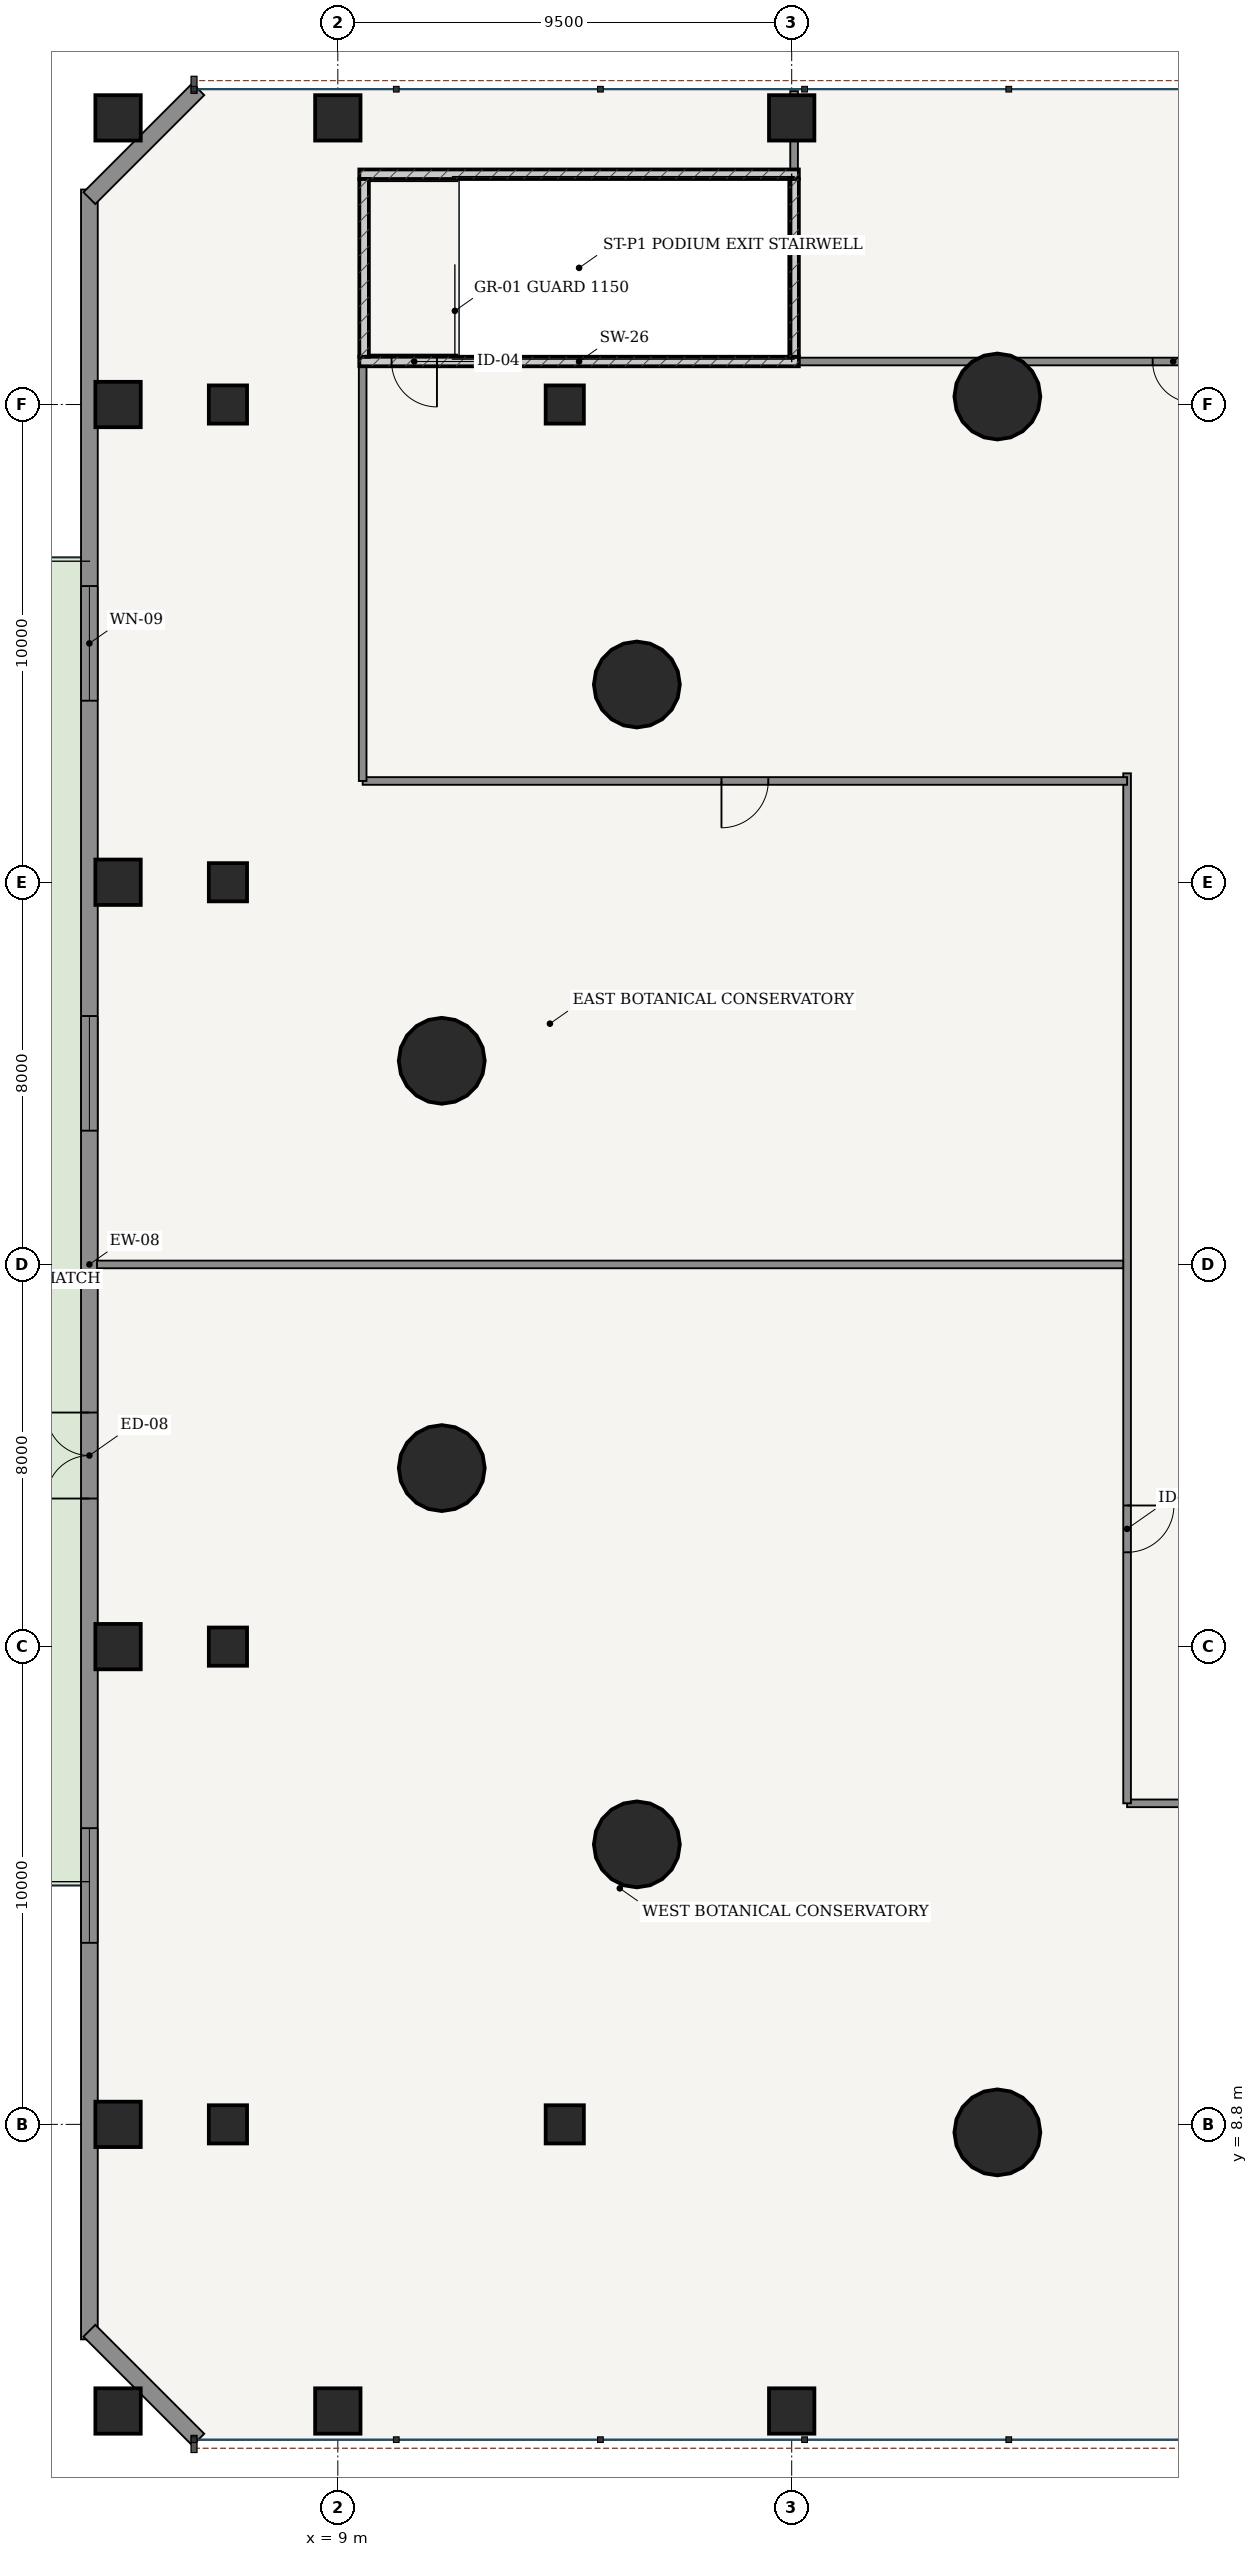
"""IFC4 building model, lengths in metres.
Left out: names, types, materials, properties, quantities, classifications, styles, units other than length and angle.
Written with IfcOpenShell. Run it as: python <this file> out.ifc"""

import sys

from ifc_helpers import new_model, si_unit, direction, frame, frame_2d, origin, origin_2d, place, context, subcontext, project, spatial, rectangle, hollow_circle, extrude, source, transform, mapped, element, fill, save


model = new_model("IFC4")
c1 = context("Model", 3, precision=1e-05, world=origin(), true_north=direction((-0.2419218956, 0.970295726276)))
c2 = subcontext(c1, "Body", "Model", "MODEL_VIEW")
j1 = project(units=[si_unit("LENGTHUNIT", "METRE"), si_unit("PLANEANGLEUNIT", "RADIAN")], contexts=[c1])
p1 = place(None, origin())
s1 = spatial("IfcSite", under=j1, at=p1, CompositionType="ELEMENT")
p2 = place(p1, origin())
s2 = spatial("IfcBuilding", under=s1, at=p2, CompositionType="ELEMENT")
p3 = place(p2, frame((0.0, 0.0, 18.9)))
s3 = spatial("IfcBuildingStorey", under=s2, at=p3, CompositionType="ELEMENT", Elevation=18.9)
p4 = place(p3, frame((9.45, 45.7, 0.0), z_axis=(0.0, 0.0, 1.0), x_axis=(1.0, 0.0, 0.0)))
e1 = element("IfcWall", 1, at=p4, inside=s3, PredefinedType="SOLIDWALL", context=c2, shape_type="SweptSolid", body=[
    extrude(rectangle(XDim=9.2, YDim=0.2, at=frame_2d((4.6, 0.0))), origin(), (0.0, 0.0, 1.0), 4.82),
])
p5 = place(p4, frame((0.675, 0.0, 0.0)))
e2 = element("IfcOpeningElement", 2, at=p5, cuts=e1, PredefinedType="OPENING", context=c2, shape_type="SweptSolid", body=[
    extrude(rectangle(XDim=0.95, YDim=2.15, at=frame_2d((0.475, 1.075))), frame((0.0, 0.11, 0.0), z_axis=(0.0, -1.0, 0.0), x_axis=(1.0, 0.0, 0.0)), (0.0, 0.0, 1.0), 0.22),
])
p6 = place(p3, frame((9.45, 49.62, 0.0), z_axis=(0.0, 0.0, 1.0), x_axis=(1.0, 0.0, 0.0)))
e3 = element("IfcWall", 3, at=p6, inside=s3, PredefinedType="SOLIDWALL", context=c2, shape_type="SweptSolid", body=[
    extrude(rectangle(XDim=9.2, YDim=0.2, at=frame_2d((4.6, 0.0))), origin(), (0.0, 0.0, 1.0), 4.82),
])
for number, where, z_axis, x_axis in (
    (4, (9.55, 45.8, 0.0), (0.0, 0.0, 1.0), (0.0, 1.0, 0.0)),
    (5, (18.55, 45.8, 0.0), (0.0, 0.0, 1.0), (0.0, 1.0, 0.0)),
):
    element("IfcWall", number, at=place(p3, frame(where, z_axis=z_axis, x_axis=x_axis)), inside=s3, PredefinedType="SOLIDWALL", context=c2, shape_type="SweptSolid", body=[
        extrude(rectangle(XDim=3.72, YDim=0.2, at=frame_2d((1.86, 0.0))), origin(), (0.0, 0.0, 1.0), 4.82),
    ])
for number, where, z_axis, x_axis in (
    (6, (22.805, 44.968, 0.0), (0.0, 0.0, 1.0), (1.0, 0.0, 0.0)),
    (7, (15.259, 38.939, 0.0), (0.0, 0.0, 1.0), (1.0, 0.0, 0.0)),
    (8, (11.176, 31.063, 0.0), (0.0, 0.0, 1.0), (1.0, 0.0, 0.0)),
    (9, (11.176, 22.537, 0.0), (0.0, 0.0, 1.0), (1.0, 0.0, 0.0)),
    (10, (15.259, 14.661, 0.0), (0.0, 0.0, 1.0), (1.0, 0.0, 0.0)),
    (11, (22.805, 8.632, 0.0), (0.0, 0.0, 1.0), (1.0, 0.0, 0.0)),
):
    element("IfcColumn", number, at=place(p3, frame(where, z_axis=z_axis, x_axis=x_axis)), inside=s3, PredefinedType="COLUMN", context=c2, shape_type="SweptSolid", body=[
        extrude(hollow_circle(Radius=0.9, WallThickness=0.055, at=origin_2d()), origin(), (0.0, 0.0, 1.0), 5.1),
    ])
for number, where, z_axis, x_axis in (
    (12, (4.4, 2.8, 0.0), (0.0, 0.0, 1.0), (1.0, 0.0, 0.0)),
    (13, (4.4, 8.8, 0.0), (0.0, 0.0, 1.0), (1.0, 0.0, 0.0)),
    (14, (4.4, 18.8, 0.0), (0.0, 0.0, 1.0), (1.0, 0.0, 0.0)),
    (15, (4.4, 34.8, 0.0), (0.0, 0.0, 1.0), (1.0, 0.0, 0.0)),
    (16, (4.4, 44.8, 0.0), (0.0, 0.0, 1.0), (1.0, 0.0, 0.0)),
    (17, (4.4, 50.8, 0.0), (0.0, 0.0, 1.0), (1.0, 0.0, 0.0)),
    (18, (9.0, 2.8, 0.0), (0.0, 0.0, 1.0), (1.0, 0.0, 0.0)),
    (19, (9.0, 50.8, 0.0), (0.0, 0.0, 1.0), (1.0, 0.0, 0.0)),
    (20, (18.5, 2.8, 0.0), (0.0, 0.0, 1.0), (1.0, 0.0, 0.0)),
    (21, (18.5, 50.8, 0.0), (0.0, 0.0, 1.0), (1.0, 0.0, 0.0)),
):
    element("IfcColumn", number, at=place(p3, frame(where, z_axis=z_axis, x_axis=x_axis)), inside=s3, PredefinedType="COLUMN", context=c2, shape_type="SweptSolid", body=[
        extrude(rectangle(XDim=0.95, YDim=0.95, at=origin_2d()), origin(), (0.0, 0.0, 1.0), 5.1),
    ])
for number, where, z_axis, x_axis in (
    (22, (6.7, 8.8, -0.45), (0.0, 0.0, 1.0), (1.0, 0.0, 0.0)),
    (23, (13.75, 8.8, -0.45), (0.0, 0.0, 1.0), (1.0, 0.0, 0.0)),
    (24, (6.7, 18.8, -0.45), (0.0, 0.0, 1.0), (1.0, 0.0, 0.0)),
    (25, (6.7, 34.8, -0.45), (0.0, 0.0, 1.0), (1.0, 0.0, 0.0)),
    (26, (6.7, 44.8, -0.45), (0.0, 0.0, 1.0), (1.0, 0.0, 0.0)),
    (27, (13.75, 44.8, -0.45), (0.0, 0.0, 1.0), (1.0, 0.0, 0.0)),
):
    element("IfcColumn", number, at=place(p3, frame(where, z_axis=z_axis, x_axis=x_axis)), inside=s3, PredefinedType="COLUMN", context=c2, shape_type="SweptSolid", body=[
        extrude(rectangle(XDim=0.8, YDim=0.8, at=origin_2d()), origin(), (0.0, 0.0, 1.0), 5.55),
    ])
p7 = place(p3, frame((3.8, 49.3, 0.0), z_axis=(0.0, 0.0, 1.0), x_axis=(0.0, -1.0, 0.0)))
e28 = element("IfcWall", 28, at=p7, inside=s3, PredefinedType="SOLIDWALL", context=c2, shape_type="SweptSolid", body=[
    extrude(rectangle(XDim=45.0, YDim=0.35, at=frame_2d((22.5, 0.0))), origin(), (0.0, 0.0, 1.0), 4.82),
])
p8 = place(p7, frame((8.3, 0.0, 0.85)))
e29 = element("IfcOpeningElement", 29, at=p8, cuts=e28, PredefinedType="OPENING", context=c2, shape_type="SweptSolid", body=[
    extrude(rectangle(XDim=2.4, YDim=2.2, at=frame_2d((1.2, 1.1))), frame((0.0, 0.185, 0.0), z_axis=(0.0, -1.0, 0.0), x_axis=(1.0, 0.0, 0.0)), (0.0, 0.0, 1.0), 0.37),
])
p9 = place(p7, frame((17.3, 0.0, 0.85)))
e30 = element("IfcOpeningElement", 30, at=p9, cuts=e28, PredefinedType="OPENING", context=c2, shape_type="SweptSolid", body=[
    extrude(rectangle(XDim=2.4, YDim=2.2, at=frame_2d((1.2, 1.1))), frame((0.0, 0.185, 0.0), z_axis=(0.0, -1.0, 0.0), x_axis=(1.0, 0.0, 0.0)), (0.0, 0.0, 1.0), 0.37),
])
p10 = place(p7, frame((34.3, 0.0, 0.85)))
e31 = element("IfcOpeningElement", 31, at=p10, cuts=e28, PredefinedType="OPENING", context=c2, shape_type="SweptSolid", body=[
    extrude(rectangle(XDim=2.4, YDim=2.2, at=frame_2d((1.2, 1.1))), frame((0.0, 0.185, 0.0), z_axis=(0.0, -1.0, 0.0), x_axis=(1.0, 0.0, 0.0)), (0.0, 0.0, 1.0), 0.37),
])
p11 = place(p7, frame((25.6, 0.0, 0.0)))
e32 = element("IfcOpeningElement", 32, at=p11, cuts=e28, PredefinedType="OPENING", context=c2, shape_type="SweptSolid", body=[
    extrude(rectangle(XDim=1.8, YDim=2.4, at=frame_2d((0.9, 1.2))), frame((0.0, 0.185, 0.0), z_axis=(0.0, -1.0, 0.0), x_axis=(1.0, 0.0, 0.0)), (0.0, 0.0, 1.0), 0.37),
])
for number, where, z_axis, x_axis in (
    (33, (3.8, 4.48, 0.0), (0.0, 0.0, 1.0), (0.707, -0.707, 0.0)),
    (34, (6.08, 51.4, 0.0), (0.0, 0.0, 1.0), (-0.707, -0.707, 0.0)),
):
    element("IfcWall", number, at=place(p3, frame(where, z_axis=z_axis, x_axis=x_axis)), inside=s3, PredefinedType="SOLIDWALL", context=c2, shape_type="SweptSolid", body=[
        extrude(rectangle(XDim=3.224, YDim=0.35, at=frame_2d((1.612, 0.0))), origin(), (0.0, 0.0, 1.0), 3.855),
    ])
p12 = place(p3, frame((25.52, 15.52, 0.0), z_axis=(0.0, 0.0, 1.0), x_axis=(1.0, 0.0, 0.0)))
e35 = element("IfcWall", 35, at=p12, inside=s3, PredefinedType="PARTITIONING", context=c2, shape_type="SweptSolid", body=[
    extrude(rectangle(XDim=24.96, YDim=0.16, at=frame_2d((12.48, 0.0))), origin(), (0.0, 0.0, 1.0), 4.188),
])
p13 = place(p12, frame((5.854, 0.0, 0.0)))
e36 = element("IfcOpeningElement", 36, at=p13, cuts=e35, PredefinedType="OPENING", context=c2, shape_type="SweptSolid", body=[
    extrude(rectangle(XDim=0.98, YDim=2.2, at=frame_2d((0.49, 1.1))), frame((0.0, 0.09, 0.0), z_axis=(0.0, -1.0, 0.0), x_axis=(1.0, 0.0, 0.0)), (0.0, 0.0, 1.0), 0.18),
])
p14 = place(p12, frame((18.125, 0.0, 0.0)))
e37 = element("IfcOpeningElement", 37, at=p14, cuts=e35, PredefinedType="OPENING", context=c2, shape_type="SweptSolid", body=[
    extrude(rectangle(XDim=0.98, YDim=2.2, at=frame_2d((0.49, 1.1))), frame((0.0, 0.09, 0.0), z_axis=(0.0, -1.0, 0.0), x_axis=(1.0, 0.0, 0.0)), (0.0, 0.0, 1.0), 0.18),
])
p15 = place(p3, frame((25.52, 15.52, 0.0), z_axis=(0.0, 0.0, 1.0), x_axis=(0.0, 1.0, 0.0)))
e38 = element("IfcWall", 38, at=p15, inside=s3, PredefinedType="PARTITIONING", context=c2, shape_type="SweptSolid", body=[
    extrude(rectangle(XDim=21.56, YDim=0.16, at=frame_2d((10.78, 0.0))), origin(), (0.0, 0.0, 1.0), 4.188),
])
p16 = place(p15, frame((5.254, 0.0, 0.0)))
e39 = element("IfcOpeningElement", 39, at=p16, cuts=e38, PredefinedType="OPENING", context=c2, shape_type="SweptSolid", body=[
    extrude(rectangle(XDim=0.98, YDim=2.2, at=frame_2d((0.49, 1.1))), frame((0.0, 0.09, 0.0), z_axis=(0.0, -1.0, 0.0), x_axis=(1.0, 0.0, 0.0)), (0.0, 0.0, 1.0), 0.18),
])
p17 = place(p3, frame((9.52, 36.92, 0.0), z_axis=(0.0, 0.0, 1.0), x_axis=(1.0, 0.0, 0.0)))
e40 = element("IfcWall", 40, at=p17, inside=s3, PredefinedType="PARTITIONING", context=c2, shape_type="SweptSolid", body=[
    extrude(rectangle(XDim=16.0, YDim=0.16, at=frame_2d((8.0, 0.0))), origin(), (0.0, 0.0, 1.0), 4.188),
])
p18 = place(p17, frame((7.51, 0.0, 0.0)))
e41 = element("IfcOpeningElement", 41, at=p18, cuts=e40, PredefinedType="OPENING", context=c2, shape_type="SweptSolid", body=[
    extrude(rectangle(XDim=0.98, YDim=2.2, at=frame_2d((0.49, 1.1))), frame((0.0, 0.09, 0.0), z_axis=(0.0, -1.0, 0.0), x_axis=(1.0, 0.0, 0.0)), (0.0, 0.0, 1.0), 0.18),
])
p19 = place(p3, frame((9.52, 36.92, 0.0), z_axis=(0.0, 0.0, 1.0), x_axis=(0.0, 1.0, 0.0)))
e42 = element("IfcWall", 42, at=p19, inside=s3, PredefinedType="PARTITIONING", context=c2, shape_type="SweptSolid", body=[
    extrude(rectangle(XDim=8.78, YDim=0.16, at=frame_2d((4.39, 0.0))), origin(), (0.0, 0.0, 1.0), 4.82),
])
p20 = place(p3, frame((18.55, 45.7, 0.0), z_axis=(0.0, 0.0, 1.0), x_axis=(1.0, 0.0, 0.0)))
e43 = element("IfcWall", 43, at=p20, inside=s3, PredefinedType="PARTITIONING", context=c2, shape_type="SweptSolid", body=[
    extrude(rectangle(XDim=38.9, YDim=0.16, at=frame_2d((19.45, 0.0))), origin(), (0.0, 0.0, 1.0), 4.188),
])
p21 = place(p20, frame((7.505, 0.0, 0.0)))
e44 = element("IfcOpeningElement", 44, at=p21, cuts=e43, PredefinedType="OPENING", context=c2, shape_type="SweptSolid", body=[
    extrude(rectangle(XDim=0.86, YDim=2.1, at=frame_2d((0.43, 1.05))), frame((0.0, 0.09, 0.0), z_axis=(0.0, -1.0, 0.0), x_axis=(1.0, 0.0, 0.0)), (0.0, 0.0, 1.0), 0.18),
])
p22 = place(p20, frame((19.02, 0.0, 0.0)))
e45 = element("IfcOpeningElement", 45, at=p22, cuts=e43, PredefinedType="OPENING", context=c2, shape_type="SweptSolid", body=[
    extrude(rectangle(XDim=0.86, YDim=2.1, at=frame_2d((0.43, 1.05))), frame((0.0, 0.09, 0.0), z_axis=(0.0, -1.0, 0.0), x_axis=(1.0, 0.0, 0.0)), (0.0, 0.0, 1.0), 0.18),
])
p23 = place(p20, frame((30.475, 0.0, 0.0)))
e46 = element("IfcOpeningElement", 46, at=p23, cuts=e43, PredefinedType="OPENING", context=c2, shape_type="SweptSolid", body=[
    extrude(rectangle(XDim=0.98, YDim=2.2, at=frame_2d((0.49, 1.1))), frame((0.0, 0.09, 0.0), z_axis=(0.0, -1.0, 0.0), x_axis=(1.0, 0.0, 0.0)), (0.0, 0.0, 1.0), 0.18),
])
p24 = place(p3, frame((3.96, 26.8, 0.0), z_axis=(0.0, 0.0, 1.0), x_axis=(1.0, 0.0, 0.0)))
e47 = element("IfcWall", 47, at=p24, inside=s3, PredefinedType="PARTITIONING", context=c2, shape_type="SweptSolid", body=[
    extrude(rectangle(XDim=21.478, YDim=0.16, at=frame_2d((10.739, 0.0))), origin(), (0.0, 0.0, 1.0), 4.262),
])
p25 = place(p3, frame((18.55, 49.722, 0.0), z_axis=(0.0, 0.0, 1.0), x_axis=(0.0, 1.0, 0.0)))
e48 = element("IfcWall", 48, at=p25, inside=s3, PredefinedType="PARTITIONING", context=c2, shape_type="SweptSolid", body=[
    extrude(rectangle(XDim=1.638, YDim=0.16, at=frame_2d((0.819, 0.0))), origin(), (0.0, 0.0, 1.0), 3.855),
])
m1 = source(origin(), c2, "Body", "SweptSolid", [
    extrude(rectangle(XDim=2.4, YDim=2.2, at=frame_2d((1.2, 1.1))), frame((0.0, 0.03, 0.0), z_axis=(0.0, -1.0, 0.0), x_axis=(1.0, 0.0, 0.0)), (0.0, 0.0, 1.0), 0.06),
])
p26 = place(p8, origin())
e49 = element("IfcWindow", 49, at=p26, inside=s3, PartitioningType="SINGLE_PANEL", PredefinedType="WINDOW", context=c2, shape_type="MappedRepresentation", body=[
    mapped(m1, transform((0.0, 0.0, 0.0), scale=1.0)),
])
fill(e29, e49)
p27 = place(p9, origin())
e50 = element("IfcWindow", 50, at=p27, inside=s3, PartitioningType="SINGLE_PANEL", PredefinedType="WINDOW", context=c2, shape_type="MappedRepresentation", body=[
    mapped(m1, transform((0.0, 0.0, 0.0), scale=1.0)),
])
fill(e30, e50)
p28 = place(p10, origin())
e51 = element("IfcWindow", 51, at=p28, inside=s3, PartitioningType="SINGLE_PANEL", PredefinedType="WINDOW", context=c2, shape_type="MappedRepresentation", body=[
    mapped(m1, transform((0.0, 0.0, 0.0), scale=1.0)),
])
fill(e31, e51)
m2 = source(origin(), c2, "Body", "SweptSolid", [
    extrude(rectangle(XDim=1.8, YDim=2.4, at=frame_2d((0.9, 1.2))), frame((0.0, 0.025, 0.0), z_axis=(0.0, -1.0, 0.0), x_axis=(1.0, 0.0, 0.0)), (0.0, 0.0, 1.0), 0.05),
])
p29 = place(p11, frame((1.8, 0.0, 0.0), z_axis=(0.0, 0.0, 1.0), x_axis=(-1.0, 0.0, 0.0)))
e52 = element("IfcDoor", 52, at=p29, inside=s3, OperationType="DOUBLE_DOOR_SINGLE_SWING", PredefinedType="DOOR", context=c2, shape_type="MappedRepresentation", body=[
    mapped(m2, transform((0.0, 0.0, 0.0), scale=1.0)),
])
fill(e32, e52)
m3 = source(origin(), c2, "Body", "SweptSolid", [
    extrude(rectangle(XDim=0.95, YDim=2.15, at=frame_2d((0.475, 1.075))), frame((0.0, 0.025, 0.0), z_axis=(0.0, -1.0, 0.0), x_axis=(1.0, 0.0, 0.0)), (0.0, 0.0, 1.0), 0.05),
])
p30 = place(p5, frame((0.95, 0.0, 0.0), z_axis=(0.0, 0.0, 1.0), x_axis=(-1.0, 0.0, 0.0)))
e53 = element("IfcDoor", 53, at=p30, inside=s3, OperationType="SINGLE_SWING_LEFT", PredefinedType="DOOR", context=c2, shape_type="MappedRepresentation", body=[
    mapped(m3, transform((0.0, 0.0, 0.0), scale=1.0)),
])
fill(e2, e53)
m4 = source(origin(), c2, "Body", "SweptSolid", [
    extrude(rectangle(XDim=0.98, YDim=2.2, at=frame_2d((0.49, 1.1))), frame((0.0, 0.025, 0.0), z_axis=(0.0, -1.0, 0.0), x_axis=(1.0, 0.0, 0.0)), (0.0, 0.0, 1.0), 0.05),
])
p31 = place(p16, frame((0.98, 0.0, 0.0), z_axis=(0.0, 0.0, 1.0), x_axis=(-1.0, 0.0, 0.0)))
e54 = element("IfcDoor", 54, at=p31, inside=s3, OperationType="SINGLE_SWING_LEFT", PredefinedType="DOOR", context=c2, shape_type="MappedRepresentation", body=[
    mapped(m4, transform((0.0, 0.0, 0.0), scale=1.0)),
])
fill(e39, e54)
p32 = place(p18, frame((0.98, 0.0, 0.0), z_axis=(0.0, 0.0, 1.0), x_axis=(-1.0, 0.0, 0.0)))
e55 = element("IfcDoor", 55, at=p32, inside=s3, OperationType="SINGLE_SWING_RIGHT", PredefinedType="DOOR", context=c2, shape_type="MappedRepresentation", body=[
    mapped(m4, transform((0.0, 0.0, 0.0), scale=1.0)),
])
fill(e41, e55)
m5 = source(origin(), c2, "Body", "SweptSolid", [
    extrude(rectangle(XDim=0.86, YDim=2.1, at=frame_2d((0.43, 1.05))), frame((0.0, 0.025, 0.0), z_axis=(0.0, -1.0, 0.0), x_axis=(1.0, 0.0, 0.0)), (0.0, 0.0, 1.0), 0.05),
])
p33 = place(p21, frame((0.86, 0.0, 0.0), z_axis=(0.0, 0.0, 1.0), x_axis=(-1.0, 0.0, 0.0)))
e56 = element("IfcDoor", 56, at=p33, inside=s3, OperationType="SINGLE_SWING_LEFT", PredefinedType="DOOR", context=c2, shape_type="MappedRepresentation", body=[
    mapped(m5, transform((0.0, 0.0, 0.0), scale=1.0)),
])
fill(e44, e56)
save(model, sys.argv[1])
